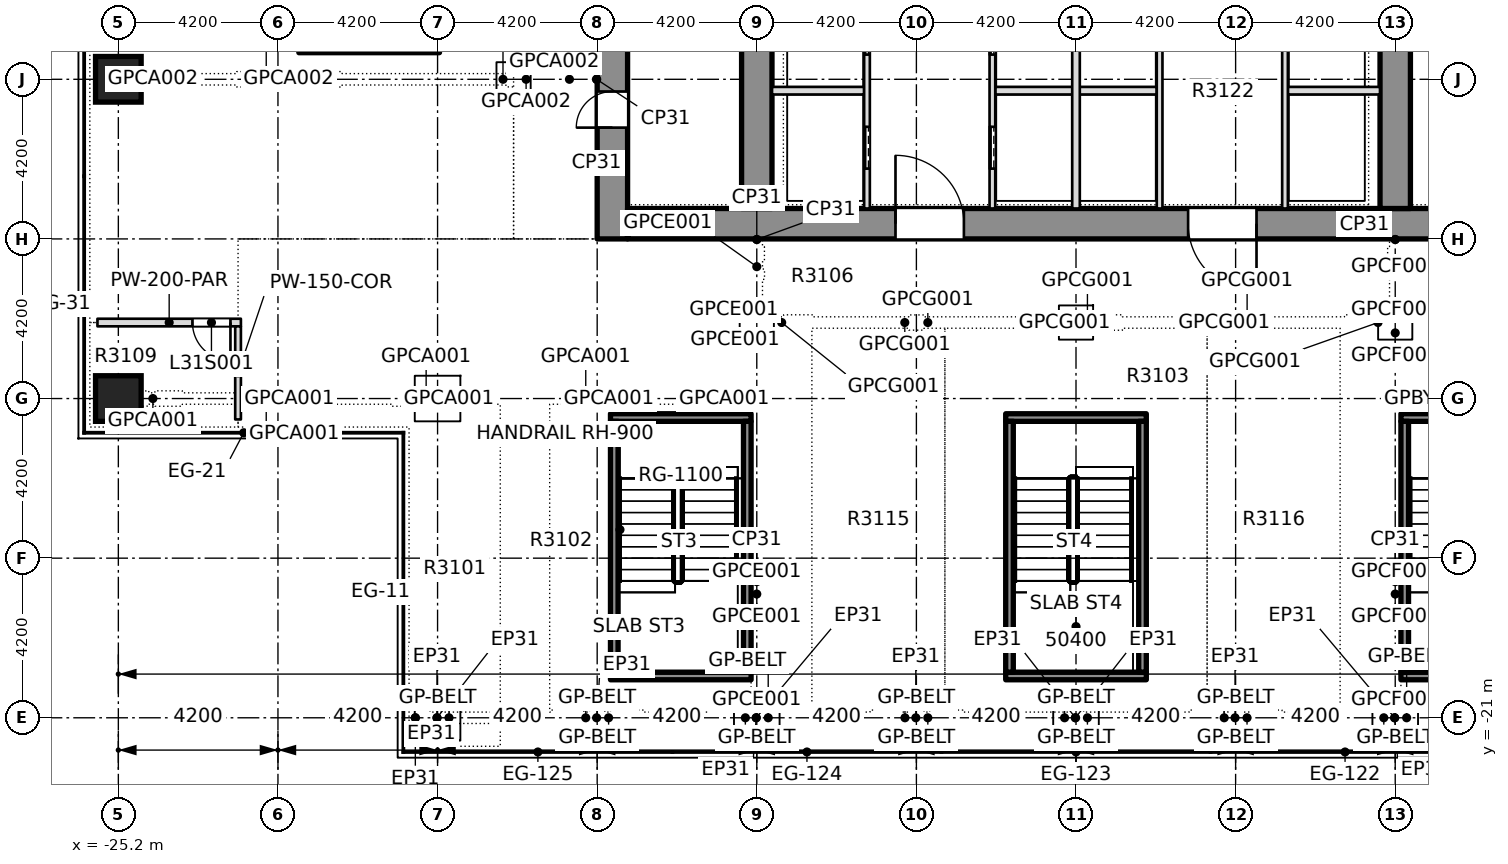
"""IFC4 building model, lengths in metres.
Left out: names, types, materials, properties, quantities, classifications, styles, units other than length and angle.
Written with IfcOpenShell. Run it as: python <this file> out.ifc"""

import sys

from ifc_helpers import new_model, si_unit, direction, frame, frame_2d, origin, origin_2d, place, context, subcontext, project, spatial, rectangle, extrude, element, fill, save


model = new_model("IFC4")
c1 = context("Model", 3, precision=1e-05, world=origin(), true_north=direction((0.0, 1.0)))
c2 = subcontext(c1, "Body", "Model", "MODEL_VIEW")
j1 = project(units=[si_unit("LENGTHUNIT", "METRE"), si_unit("PLANEANGLEUNIT", "RADIAN")], contexts=[c1])
p1 = place(None, origin())
s1 = spatial("IfcSite", under=j1, at=p1, CompositionType="ELEMENT")
p2 = place(p1, origin())
s2 = spatial("IfcBuilding", under=s1, at=p2, CompositionType="ELEMENT")
p3 = place(p2, frame((0.0, 0.0, 121.8)))
s3 = spatial("IfcBuildingStorey", under=s2, at=p3, CompositionType="ELEMENT", Elevation=121.8)
p4 = place(p3, frame((-12.2, -8.4, 0.0), z_axis=(0.0, 0.0, 1.0), x_axis=(0.0, 1.0, 0.0)))
e1 = element("IfcWall", 1, at=p4, inside=s3, PredefinedType="SHEAR", context=c2, shape_type="SweptSolid", body=[
    extrude(rectangle(XDim=30.15, YDim=0.8, at=frame_2d((15.075, 0.0))), origin(), (0.0, 0.0, 1.0), 6.1),
])
p5 = place(p4, frame((2.928, 0.0, 0.0)))
e2 = element("IfcOpeningElement", 2, at=p5, cuts=e1, PredefinedType="OPENING", context=c2, shape_type="SweptSolid", body=[
    extrude(rectangle(XDim=0.95, YDim=2.1, at=frame_2d((0.475, 1.05))), frame((0.0, 0.41, 0.0), z_axis=(0.0, -1.0, 0.0), x_axis=(1.0, 0.0, 0.0)), (0.0, 0.0, 1.0), 0.82),
])
p6 = place(p4, frame((8.594, 0.0, 0.0)))
e3 = element("IfcOpeningElement", 3, at=p6, cuts=e1, PredefinedType="OPENING", context=c2, shape_type="SweptSolid", body=[
    extrude(rectangle(XDim=0.95, YDim=2.1, at=frame_2d((0.475, 1.05))), frame((0.0, 0.41, 0.0), z_axis=(0.0, -1.0, 0.0), x_axis=(1.0, 0.0, 0.0)), (0.0, 0.0, 1.0), 0.82),
])
p7 = place(p4, frame((12.921, 0.0, 0.0)))
e4 = element("IfcOpeningElement", 4, at=p7, cuts=e1, PredefinedType="OPENING", context=c2, shape_type="SweptSolid", body=[
    extrude(rectangle(XDim=0.95, YDim=2.1, at=frame_2d((0.475, 1.05))), frame((0.0, 0.41, 0.0), z_axis=(0.0, -1.0, 0.0), x_axis=(1.0, 0.0, 0.0)), (0.0, 0.0, 1.0), 0.82),
])
p8 = place(p4, frame((16.656, 0.0, 0.0)))
e5 = element("IfcOpeningElement", 5, at=p8, cuts=e1, PredefinedType="OPENING", context=c2, shape_type="SweptSolid", body=[
    extrude(rectangle(XDim=0.95, YDim=2.1, at=frame_2d((0.475, 1.05))), frame((0.0, 0.41, 0.0), z_axis=(0.0, -1.0, 0.0), x_axis=(1.0, 0.0, 0.0)), (0.0, 0.0, 1.0), 0.82),
])
p9 = place(p4, frame((23.777, 0.0, 0.0)))
e6 = element("IfcOpeningElement", 6, at=p9, cuts=e1, PredefinedType="OPENING", context=c2, shape_type="SweptSolid", body=[
    extrude(rectangle(XDim=0.95, YDim=2.1, at=frame_2d((0.475, 1.05))), frame((0.0, 0.41, 0.0), z_axis=(0.0, -1.0, 0.0), x_axis=(1.0, 0.0, 0.0)), (0.0, 0.0, 1.0), 0.82),
])
p10 = place(p4, frame((27.102, 0.0, 0.0)))
e7 = element("IfcOpeningElement", 7, at=p10, cuts=e1, PredefinedType="OPENING", context=c2, shape_type="SweptSolid", body=[
    extrude(rectangle(XDim=0.95, YDim=2.1, at=frame_2d((0.475, 1.05))), frame((0.0, 0.41, 0.0), z_axis=(0.0, -1.0, 0.0), x_axis=(1.0, 0.0, 0.0)), (0.0, 0.0, 1.0), 0.82),
])
p11 = place(p4, frame((21.4, 0.0, 0.0)))
e8 = element("IfcOpeningElement", 8, at=p11, cuts=e1, PredefinedType="OPENING", context=c2, shape_type="SweptSolid", body=[
    extrude(rectangle(XDim=1.2, YDim=2.1, at=frame_2d((0.6, 1.05))), frame((0.0, 0.41, 0.0), z_axis=(0.0, -1.0, 0.0), x_axis=(1.0, 0.0, 0.0)), (0.0, 0.0, 1.0), 0.82),
])
p12 = place(p3, frame((-11.8, -8.0, 0.0), z_axis=(0.0, 0.0, 1.0), x_axis=(1.0, 0.0, 0.0)))
e9 = element("IfcWall", 9, at=p12, inside=s3, PredefinedType="SHEAR", context=c2, shape_type="SweptSolid", body=[
    extrude(rectangle(XDim=23.6, YDim=0.8, at=frame_2d((11.8, 0.0))), origin(), (0.0, 0.0, 1.0), 6.1),
])
p13 = place(p12, frame((7.05, 0.0, 0.0)))
e10 = element("IfcOpeningElement", 10, at=p13, cuts=e9, PredefinedType="OPENING", context=c2, shape_type="SweptSolid", body=[
    extrude(rectangle(XDim=1.8, YDim=2.1, at=frame_2d((0.9, 1.05))), frame((0.0, 0.41, 0.0), z_axis=(0.0, -1.0, 0.0), x_axis=(1.0, 0.0, 0.0)), (0.0, 0.0, 1.0), 0.82),
])
p14 = place(p12, frame((14.75, 0.0, 0.0)))
e11 = element("IfcOpeningElement", 11, at=p14, cuts=e9, PredefinedType="OPENING", context=c2, shape_type="SweptSolid", body=[
    extrude(rectangle(XDim=1.8, YDim=2.1, at=frame_2d((0.9, 1.05))), frame((0.0, 0.41, 0.0), z_axis=(0.0, -1.0, 0.0), x_axis=(1.0, 0.0, 0.0)), (0.0, 0.0, 1.0), 0.82),
])
p15 = place(p3, frame((-8.4, -7.6, 0.0), z_axis=(0.0, 0.0, 1.0), x_axis=(0.0, 1.0, 0.0)))
e12 = element("IfcWall", 12, at=p15, inside=s3, PredefinedType="SHEAR", context=c2, shape_type="SweptSolid", body=[
    extrude(rectangle(XDim=28.55, YDim=0.8, at=frame_2d((14.275, 0.0))), origin(), (0.0, 0.0, 1.0), 6.1),
])
p16 = place(p15, frame((19.2, 0.0, 0.0)))
e13 = element("IfcOpeningElement", 13, at=p16, cuts=e12, PredefinedType="OPENING", context=c2, shape_type="SweptSolid", body=[
    extrude(rectangle(XDim=1.2, YDim=2.1, at=frame_2d((0.6, 1.05))), frame((0.0, 0.41, 0.0), z_axis=(0.0, -1.0, 0.0), x_axis=(1.0, 0.0, 0.0)), (0.0, 0.0, 1.0), 0.82),
])
p17 = place(p3, frame((8.4, -7.6, 0.0), z_axis=(0.0, 0.0, 1.0), x_axis=(0.0, 1.0, 0.0)))
e14 = element("IfcWall", 14, at=p17, inside=s3, PredefinedType="SHEAR", context=c2, shape_type="SweptSolid", body=[
    extrude(rectangle(XDim=28.55, YDim=0.8, at=frame_2d((14.275, 0.0))), origin(), (0.0, 0.0, 1.0), 6.1),
])
p18 = place(p17, frame((19.2, 0.0, 0.0)))
e15 = element("IfcOpeningElement", 15, at=p18, cuts=e14, PredefinedType="OPENING", context=c2, shape_type="SweptSolid", body=[
    extrude(rectangle(XDim=1.2, YDim=2.1, at=frame_2d((0.6, 1.05))), frame((0.0, 0.41, 0.0), z_axis=(0.0, -1.0, 0.0), x_axis=(1.0, 0.0, 0.0)), (0.0, 0.0, 1.0), 0.82),
])
for number, where, z_axis, x_axis in (
    (16, (-25.2, -12.6, -0.45), (0.0, 0.0, 1.0), (1.0, 0.0, 0.0)),
    (17, (-25.2, -4.2, -0.45), (0.0, 0.0, 1.0), (1.0, 0.0, 0.0)),
):
    element("IfcColumn", number, at=place(p3, frame(where, z_axis=z_axis, x_axis=x_axis)), inside=s3, PredefinedType="COLUMN", context=c2, shape_type="SweptSolid", body=[
        extrude(rectangle(XDim=1.2, YDim=1.2, at=origin_2d()), origin(), (0.0, 0.0, 1.0), 6.55),
    ])
p19 = place(p3, frame((-25.75, -10.6, 0.0), z_axis=(0.0, 0.0, 1.0), x_axis=(1.0, 0.0, 0.0)))
e18 = element("IfcWall", 18, at=p19, inside=s3, PredefinedType="PARTITIONING", context=c2, shape_type="SweptSolid", body=[
    extrude(rectangle(XDim=3.775, YDim=0.2, at=frame_2d((1.887, 0.0))), origin(), (0.0, 0.0, 1.0), 6.1),
])
p20 = place(p19, frame((2.5, 0.0, 0.0)))
e19 = element("IfcOpeningElement", 19, at=p20, cuts=e18, PredefinedType="OPENING", context=c2, shape_type="SweptSolid", body=[
    extrude(rectangle(XDim=1.0, YDim=2.1, at=frame_2d((0.5, 1.05))), frame((0.0, 0.11, 0.0), z_axis=(0.0, -1.0, 0.0), x_axis=(1.0, 0.0, 0.0)), (0.0, 0.0, 1.0), 0.22),
])
p21 = place(p3, frame((-22.05, -13.15, 0.0), z_axis=(0.0, 0.0, 1.0), x_axis=(0.0, 1.0, 0.0)))
e20 = element("IfcWall", 20, at=p21, inside=s3, PredefinedType="PARTITIONING", context=c2, shape_type="SweptSolid", body=[
    extrude(rectangle(XDim=2.45, YDim=0.15, at=frame_2d((1.225, 0.0))), origin(), (0.0, 0.0, 1.0), 6.1),
])
p22 = place(p3, frame((-7.999, -4.5, 0.0), z_axis=(0.0, 0.0, 1.0), x_axis=(1.0, 0.0, 0.0)))
e21 = element("IfcWall", 21, at=p22, inside=s3, PredefinedType="PARTITIONING", context=c2, shape_type="SweptSolid", body=[
    extrude(rectangle(XDim=2.424, YDim=0.2, at=frame_2d((1.212, 0.0))), origin(), (0.0, 0.0, 1.0), 6.1),
])
p23 = place(p3, frame((-2.125, -4.5, 0.0), z_axis=(0.0, 0.0, 1.0), x_axis=(1.0, 0.0, 0.0)))
e22 = element("IfcWall", 22, at=p23, inside=s3, PredefinedType="PARTITIONING", context=c2, shape_type="SweptSolid", body=[
    extrude(rectangle(XDim=4.25, YDim=0.2, at=frame_2d((2.125, 0.0))), origin(), (0.0, 0.0, 1.0), 6.1),
])
p24 = place(p3, frame((5.575, -4.5, 0.0), z_axis=(0.0, 0.0, 1.0), x_axis=(1.0, 0.0, 0.0)))
e23 = element("IfcWall", 23, at=p24, inside=s3, PredefinedType="PARTITIONING", context=c2, shape_type="SweptSolid", body=[
    extrude(rectangle(XDim=2.424, YDim=0.2, at=frame_2d((1.212, 0.0))), origin(), (0.0, 0.0, 1.0), 6.1),
])
p25 = place(p3, frame((-5.5, -7.599, 0.0), z_axis=(0.0, 0.0, 1.0), x_axis=(0.0, 1.0, 0.0)))
e24 = element("IfcWall", 24, at=p25, inside=s3, PredefinedType="PARTITIONING", context=c2, shape_type="SweptSolid", body=[
    extrude(rectangle(XDim=12.024, YDim=0.15, at=frame_2d((6.012, 0.0))), origin(), (0.0, 0.0, 1.0), 6.1),
])
p26 = place(p25, frame((1.049, 0.0, 0.0)))
e25 = element("IfcOpeningElement", 25, at=p26, cuts=e24, PredefinedType="OPENING", context=c2, shape_type="SweptSolid", body=[
    extrude(rectangle(XDim=1.1, YDim=2.1, at=frame_2d((0.55, 1.05))), frame((0.0, 0.085, 0.0), z_axis=(0.0, -1.0, 0.0), x_axis=(1.0, 0.0, 0.0)), (0.0, 0.0, 1.0), 0.17),
])
p27 = place(p25, frame((4.049, 0.0, 0.0)))
e26 = element("IfcOpeningElement", 26, at=p27, cuts=e24, PredefinedType="OPENING", context=c2, shape_type="SweptSolid", body=[
    extrude(rectangle(XDim=1.1, YDim=2.1, at=frame_2d((0.55, 1.05))), frame((0.0, 0.085, 0.0), z_axis=(0.0, -1.0, 0.0), x_axis=(1.0, 0.0, 0.0)), (0.0, 0.0, 1.0), 0.17),
])
p28 = place(p25, frame((7.049, 0.0, 0.0)))
e27 = element("IfcOpeningElement", 27, at=p28, cuts=e24, PredefinedType="OPENING", context=c2, shape_type="SweptSolid", body=[
    extrude(rectangle(XDim=1.1, YDim=2.1, at=frame_2d((0.55, 1.05))), frame((0.0, 0.085, 0.0), z_axis=(0.0, -1.0, 0.0), x_axis=(1.0, 0.0, 0.0)), (0.0, 0.0, 1.0), 0.17),
])
p29 = place(p25, frame((10.049, 0.0, 0.0)))
e28 = element("IfcOpeningElement", 28, at=p29, cuts=e24, PredefinedType="OPENING", context=c2, shape_type="SweptSolid", body=[
    extrude(rectangle(XDim=1.1, YDim=2.1, at=frame_2d((0.55, 1.05))), frame((0.0, 0.085, 0.0), z_axis=(0.0, -1.0, 0.0), x_axis=(1.0, 0.0, 0.0)), (0.0, 0.0, 1.0), 0.17),
])
p30 = place(p3, frame((-2.2, -7.599, 0.0), z_axis=(0.0, 0.0, 1.0), x_axis=(0.0, 1.0, 0.0)))
e29 = element("IfcWall", 29, at=p30, inside=s3, PredefinedType="PARTITIONING", context=c2, shape_type="SweptSolid", body=[
    extrude(rectangle(XDim=12.024, YDim=0.15, at=frame_2d((6.012, 0.0))), origin(), (0.0, 0.0, 1.0), 6.1),
])
p31 = place(p30, frame((1.049, 0.0, 0.0)))
e30 = element("IfcOpeningElement", 30, at=p31, cuts=e29, PredefinedType="OPENING", context=c2, shape_type="SweptSolid", body=[
    extrude(rectangle(XDim=1.1, YDim=2.1, at=frame_2d((0.55, 1.05))), frame((0.0, 0.085, 0.0), z_axis=(0.0, -1.0, 0.0), x_axis=(1.0, 0.0, 0.0)), (0.0, 0.0, 1.0), 0.17),
])
p32 = place(p30, frame((4.049, 0.0, 0.0)))
e31 = element("IfcOpeningElement", 31, at=p32, cuts=e29, PredefinedType="OPENING", context=c2, shape_type="SweptSolid", body=[
    extrude(rectangle(XDim=1.1, YDim=2.1, at=frame_2d((0.55, 1.05))), frame((0.0, 0.085, 0.0), z_axis=(0.0, -1.0, 0.0), x_axis=(1.0, 0.0, 0.0)), (0.0, 0.0, 1.0), 0.17),
])
p33 = place(p30, frame((7.049, 0.0, 0.0)))
e32 = element("IfcOpeningElement", 32, at=p33, cuts=e29, PredefinedType="OPENING", context=c2, shape_type="SweptSolid", body=[
    extrude(rectangle(XDim=1.1, YDim=2.1, at=frame_2d((0.55, 1.05))), frame((0.0, 0.085, 0.0), z_axis=(0.0, -1.0, 0.0), x_axis=(1.0, 0.0, 0.0)), (0.0, 0.0, 1.0), 0.17),
])
p34 = place(p30, frame((10.049, 0.0, 0.0)))
e33 = element("IfcOpeningElement", 33, at=p34, cuts=e29, PredefinedType="OPENING", context=c2, shape_type="SweptSolid", body=[
    extrude(rectangle(XDim=1.1, YDim=2.1, at=frame_2d((0.55, 1.05))), frame((0.0, 0.085, 0.0), z_axis=(0.0, -1.0, 0.0), x_axis=(1.0, 0.0, 0.0)), (0.0, 0.0, 1.0), 0.17),
])
p35 = place(p3, frame((0.0, -7.599, 0.0), z_axis=(0.0, 0.0, 1.0), x_axis=(0.0, 1.0, 0.0)))
e34 = element("IfcWall", 34, at=p35, inside=s3, PredefinedType="PARTITIONING", context=c2, shape_type="SweptSolid", body=[
    extrude(rectangle(XDim=12.024, YDim=0.2, at=frame_2d((6.012, 0.0))), origin(), (0.0, 0.0, 1.0), 6.1),
])
p36 = place(p3, frame((2.2, -7.599, 0.0), z_axis=(0.0, 0.0, 1.0), x_axis=(0.0, 1.0, 0.0)))
e35 = element("IfcWall", 35, at=p36, inside=s3, PredefinedType="PARTITIONING", context=c2, shape_type="SweptSolid", body=[
    extrude(rectangle(XDim=12.024, YDim=0.15, at=frame_2d((6.012, 0.0))), origin(), (0.0, 0.0, 1.0), 6.1),
])
p37 = place(p3, frame((5.5, -7.599, 0.0), z_axis=(0.0, 0.0, 1.0), x_axis=(0.0, 1.0, 0.0)))
e36 = element("IfcWall", 36, at=p37, inside=s3, PredefinedType="PARTITIONING", context=c2, shape_type="SweptSolid", body=[
    extrude(rectangle(XDim=12.024, YDim=0.15, at=frame_2d((6.012, 0.0))), origin(), (0.0, 0.0, 1.0), 6.1),
])
p38 = place(p37, frame((6.624, 0.0, 0.0)))
e37 = element("IfcOpeningElement", 37, at=p38, cuts=e36, PredefinedType="OPENING", context=c2, shape_type="SweptSolid", body=[
    extrude(rectangle(XDim=0.95, YDim=2.1, at=frame_2d((0.475, 1.05))), frame((0.0, 0.085, 0.0), z_axis=(0.0, -1.0, 0.0), x_axis=(1.0, 0.0, 0.0)), (0.0, 0.0, 1.0), 0.17),
])
p39 = place(p37, frame((8.624, 0.0, 0.0)))
e38 = element("IfcOpeningElement", 38, at=p39, cuts=e36, PredefinedType="OPENING", context=c2, shape_type="SweptSolid", body=[
    extrude(rectangle(XDim=0.95, YDim=2.1, at=frame_2d((0.475, 1.05))), frame((0.0, 0.085, 0.0), z_axis=(0.0, -1.0, 0.0), x_axis=(1.0, 0.0, 0.0)), (0.0, 0.0, 1.0), 0.17),
])
p40 = place(p37, frame((10.624, 0.0, 0.0)))
e39 = element("IfcOpeningElement", 39, at=p40, cuts=e36, PredefinedType="OPENING", context=c2, shape_type="SweptSolid", body=[
    extrude(rectangle(XDim=0.95, YDim=2.1, at=frame_2d((0.475, 1.05))), frame((0.0, 0.085, 0.0), z_axis=(0.0, -1.0, 0.0), x_axis=(1.0, 0.0, 0.0)), (0.0, 0.0, 1.0), 0.17),
])
for number, where, z_axis, x_axis in (
    (40, (-12.25, -19.9, 0.0), (0.0, 0.0, 1.0), (1.0, 0.0, 0.0)),
    (41, (-12.25, -13.1, 0.0), (0.0, 0.0, 1.0), (1.0, 0.0, 0.0)),
):
    element("IfcWall", number, at=place(p3, frame(where, z_axis=z_axis, x_axis=x_axis)), inside=s3, PredefinedType="SOLIDWALL", context=c2, shape_type="SweptSolid", body=[
        extrude(rectangle(XDim=3.7, YDim=0.2, at=frame_2d((1.85, 0.0))), origin(), (0.0, 0.0, 1.0), 6.1),
    ])
for number, where, z_axis, x_axis in (
    (42, (-12.15, -19.8, 0.0), (0.0, 0.0, 1.0), (0.0, 1.0, 0.0)),
    (43, (-8.65, -19.8, 0.0), (0.0, 0.0, 1.0), (0.0, 1.0, 0.0)),
):
    element("IfcWall", number, at=place(p3, frame(where, z_axis=z_axis, x_axis=x_axis)), inside=s3, PredefinedType="SOLIDWALL", context=c2, shape_type="SweptSolid", body=[
        extrude(rectangle(XDim=6.6, YDim=0.2, at=frame_2d((3.3, 0.0))), origin(), (0.0, 0.0, 1.0), 6.1),
    ])
for number, where, z_axis, x_axis in (
    (44, (-1.85, -19.9, 0.0), (0.0, 0.0, 1.0), (1.0, 0.0, 0.0)),
    (45, (-1.85, -13.1, 0.0), (0.0, 0.0, 1.0), (1.0, 0.0, 0.0)),
):
    element("IfcWall", number, at=place(p3, frame(where, z_axis=z_axis, x_axis=x_axis)), inside=s3, PredefinedType="SOLIDWALL", context=c2, shape_type="SweptSolid", body=[
        extrude(rectangle(XDim=3.7, YDim=0.2, at=frame_2d((1.85, 0.0))), origin(), (0.0, 0.0, 1.0), 6.1),
    ])
for number, where, z_axis, x_axis in (
    (46, (-1.75, -19.8, 0.0), (0.0, 0.0, 1.0), (0.0, 1.0, 0.0)),
    (47, (1.75, -19.8, 0.0), (0.0, 0.0, 1.0), (0.0, 1.0, 0.0)),
):
    element("IfcWall", number, at=place(p3, frame(where, z_axis=z_axis, x_axis=x_axis)), inside=s3, PredefinedType="SOLIDWALL", context=c2, shape_type="SweptSolid", body=[
        extrude(rectangle(XDim=6.6, YDim=0.2, at=frame_2d((3.3, 0.0))), origin(), (0.0, 0.0, 1.0), 6.1),
    ])
for number, where, z_axis, x_axis in (
    (48, (8.55, -19.9, 0.0), (0.0, 0.0, 1.0), (1.0, 0.0, 0.0)),
    (49, (8.55, -13.1, 0.0), (0.0, 0.0, 1.0), (1.0, 0.0, 0.0)),
):
    element("IfcWall", number, at=place(p3, frame(where, z_axis=z_axis, x_axis=x_axis)), inside=s3, PredefinedType="SOLIDWALL", context=c2, shape_type="SweptSolid", body=[
        extrude(rectangle(XDim=3.7, YDim=0.2, at=frame_2d((1.85, 0.0))), origin(), (0.0, 0.0, 1.0), 6.1),
    ])
p41 = place(p3, frame((8.65, -19.8, 0.0), z_axis=(0.0, 0.0, 1.0), x_axis=(0.0, 1.0, 0.0)))
e50 = element("IfcWall", 50, at=p41, inside=s3, PredefinedType="SOLIDWALL", context=c2, shape_type="SweptSolid", body=[
    extrude(rectangle(XDim=6.6, YDim=0.2, at=frame_2d((3.3, 0.0))), origin(), (0.0, 0.0, 1.0), 6.1),
])
p42 = place(p20, origin())
e51 = element("IfcDoor", 51, at=p42, inside=s3, OperationType="SINGLE_SWING_LEFT", PredefinedType="DOOR", context=c2, shape_type="SweptSolid", body=[
    extrude(rectangle(XDim=1.0, YDim=2.1, at=frame_2d((0.5, 1.05))), frame((0.0, 0.025, 0.0), z_axis=(0.0, -1.0, 0.0), x_axis=(1.0, 0.0, 0.0)), (0.0, 0.0, 1.0), 0.05),
])
fill(e19, e51)
p43 = place(p26, origin())
e52 = element("IfcDoor", 52, at=p43, inside=s3, OperationType="SLIDING_TO_LEFT", PredefinedType="DOOR", context=c2, shape_type="SweptSolid", body=[
    extrude(rectangle(XDim=1.1, YDim=2.1, at=frame_2d((0.55, 1.05))), frame((0.0, 0.025, 0.0), z_axis=(0.0, -1.0, 0.0), x_axis=(1.0, 0.0, 0.0)), (0.0, 0.0, 1.0), 0.05),
])
fill(e25, e52)
p44 = place(p27, origin())
e53 = element("IfcDoor", 53, at=p44, inside=s3, OperationType="SLIDING_TO_LEFT", PredefinedType="DOOR", context=c2, shape_type="SweptSolid", body=[
    extrude(rectangle(XDim=1.1, YDim=2.1, at=frame_2d((0.55, 1.05))), frame((0.0, 0.025, 0.0), z_axis=(0.0, -1.0, 0.0), x_axis=(1.0, 0.0, 0.0)), (0.0, 0.0, 1.0), 0.05),
])
fill(e26, e53)
p45 = place(p31, origin())
e54 = element("IfcDoor", 54, at=p45, inside=s3, OperationType="SLIDING_TO_LEFT", PredefinedType="DOOR", context=c2, shape_type="SweptSolid", body=[
    extrude(rectangle(XDim=1.1, YDim=2.1, at=frame_2d((0.55, 1.05))), frame((0.0, 0.025, 0.0), z_axis=(0.0, -1.0, 0.0), x_axis=(1.0, 0.0, 0.0)), (0.0, 0.0, 1.0), 0.05),
])
fill(e30, e54)
p46 = place(p32, origin())
e55 = element("IfcDoor", 55, at=p46, inside=s3, OperationType="SLIDING_TO_LEFT", PredefinedType="DOOR", context=c2, shape_type="SweptSolid", body=[
    extrude(rectangle(XDim=1.1, YDim=2.1, at=frame_2d((0.55, 1.05))), frame((0.0, 0.025, 0.0), z_axis=(0.0, -1.0, 0.0), x_axis=(1.0, 0.0, 0.0)), (0.0, 0.0, 1.0), 0.05),
])
fill(e31, e55)
p47 = place(p13, origin())
e56 = element("IfcDoor", 56, at=p47, inside=s3, OperationType="SINGLE_SWING_LEFT", PredefinedType="DOOR", context=c2, shape_type="SweptSolid", body=[
    extrude(rectangle(XDim=1.8, YDim=2.1, at=frame_2d((0.9, 1.05))), frame((0.0, 0.025, 0.0), z_axis=(0.0, -1.0, 0.0), x_axis=(1.0, 0.0, 0.0)), (0.0, 0.0, 1.0), 0.05),
])
fill(e10, e56)
p48 = place(p14, origin())
e57 = element("IfcDoor", 57, at=p48, inside=s3, OperationType="SINGLE_SWING_LEFT", PredefinedType="DOOR", context=c2, shape_type="SweptSolid", body=[
    extrude(rectangle(XDim=1.8, YDim=2.1, at=frame_2d((0.9, 1.05))), frame((0.0, 0.025, 0.0), z_axis=(0.0, -1.0, 0.0), x_axis=(1.0, 0.0, 0.0)), (0.0, 0.0, 1.0), 0.05),
])
fill(e11, e57)
p49 = place(p5, origin())
e58 = element("IfcDoor", 58, at=p49, inside=s3, OperationType="SINGLE_SWING_LEFT", PredefinedType="DOOR", context=c2, shape_type="SweptSolid", body=[
    extrude(rectangle(XDim=0.95, YDim=2.1, at=frame_2d((0.475, 1.05))), frame((0.0, 0.025, 0.0), z_axis=(0.0, -1.0, 0.0), x_axis=(1.0, 0.0, 0.0)), (0.0, 0.0, 1.0), 0.05),
])
fill(e2, e58)
save(model, sys.argv[1])
